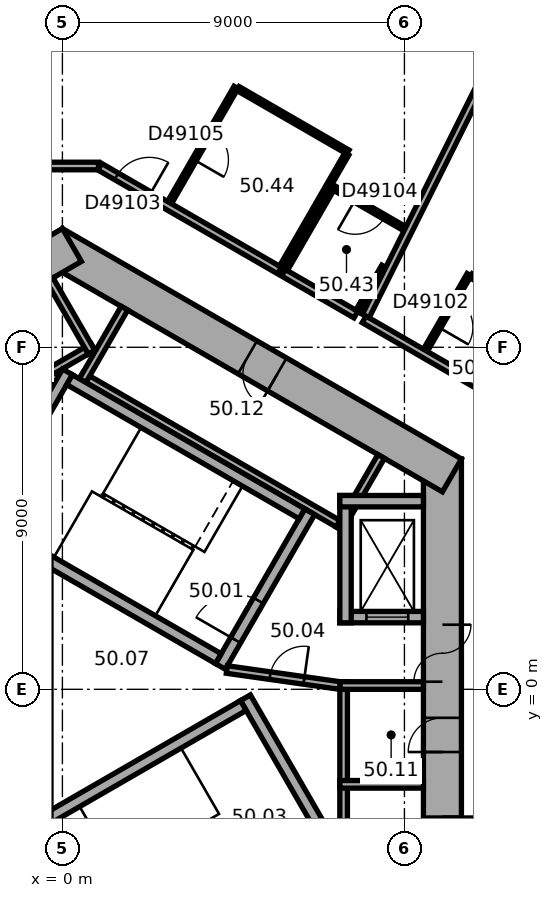
"""IFC4 building model, lengths in metres.
Left out: names, types, materials, properties, quantities, classifications, styles, units other than length and angle.
Written with IfcOpenShell. Run it as: python <this file> out.ifc"""

import sys

from ifc_helpers import new_model, si_unit, direction, frame, frame_2d, origin, place, context, subcontext, project, spatial, rectangle, extrude, element, fill, save


model = new_model("IFC4")
c1 = context("Model", 3, precision=1e-05, world=origin(), true_north=direction((0.0, 1.0)))
c2 = subcontext(c1, "Body", "Model", "MODEL_VIEW")
j1 = project(units=[si_unit("LENGTHUNIT", "METRE"), si_unit("PLANEANGLEUNIT", "RADIAN")], contexts=[c1])
p1 = place(None, origin())
s1 = spatial("IfcSite", under=j1, at=p1, CompositionType="ELEMENT")
p2 = place(p1, origin())
s2 = spatial("IfcBuilding", under=s1, at=p2, CompositionType="ELEMENT")
p3 = place(p2, frame((0.0, 0.0, 202.1)))
s3 = spatial("IfcBuildingStorey", under=s2, at=p3, CompositionType="ELEMENT", Elevation=202.1)
p4 = place(p3, frame((10.0, -6.062, 0.0), z_axis=(0.0, 0.0, 1.0), x_axis=(0.0, 1.0, 0.0)))
e1 = element("IfcWall", 1, at=p4, inside=s3, PredefinedType="SHEAR", context=c2, shape_type="SweptSolid", body=[
    extrude(rectangle(XDim=12.125, YDim=1.0, at=frame_2d((6.062, 0.0))), origin(), (0.0, 0.0, 1.0), 3.7),
])
p5 = place(p4, frame((6.262, 0.0, 0.0)))
e2 = element("IfcOpeningElement", 2, at=p5, cuts=e1, PredefinedType="OPENING", context=c2, shape_type="SweptSolid", body=[
    extrude(rectangle(XDim=1.5, YDim=2.1, at=frame_2d((0.75, 1.05))), frame((0.0, 0.51, 0.0), z_axis=(0.0, -1.0, 0.0), x_axis=(1.0, 0.0, 0.0)), (0.0, 0.0, 1.0), 1.02),
])
p6 = place(p4, frame((1.812, 0.0, 0.0)))
e3 = element("IfcOpeningElement", 3, at=p6, cuts=e1, PredefinedType="OPENING", context=c2, shape_type="SweptSolid", body=[
    extrude(rectangle(XDim=0.9, YDim=2.1, at=frame_2d((0.45, 1.05))), frame((0.0, 0.51, 0.0), z_axis=(0.0, -1.0, 0.0), x_axis=(1.0, 0.0, 0.0)), (0.0, 0.0, 1.0), 1.02),
])
p7 = place(p4, frame((4.412, 0.0, 0.0)))
e4 = element("IfcOpeningElement", 4, at=p7, cuts=e1, PredefinedType="OPENING", context=c2, shape_type="SweptSolid", body=[
    extrude(rectangle(XDim=0.9, YDim=2.1, at=frame_2d((0.45, 1.05))), frame((0.0, 0.51, 0.0), z_axis=(0.0, -1.0, 0.0), x_axis=(1.0, 0.0, 0.0)), (0.0, 0.0, 1.0), 1.02),
])
p8 = place(p3, frame((10.25, 5.629, 0.0), z_axis=(0.0, 0.0, 1.0), x_axis=(-0.866022616891, 0.50000482701, 0.0)))
e5 = element("IfcWall", 5, at=p8, inside=s3, PredefinedType="SHEAR", context=c2, shape_type="SweptSolid", body=[
    extrude(rectangle(XDim=12.125, YDim=1.0, at=frame_2d((6.062, 0.0))), origin(), (0.0, 0.0, 1.0), 3.7),
])
p9 = place(p8, frame((5.312, 0.0, 0.0)))
e6 = element("IfcOpeningElement", 6, at=p9, cuts=e5, PredefinedType="OPENING", context=c2, shape_type="SweptSolid", body=[
    extrude(rectangle(XDim=0.9, YDim=2.1, at=frame_2d((0.45, 1.05))), frame((0.0, 0.51, 0.0), z_axis=(0.0, -1.0, 0.0), x_axis=(1.0, 0.0, 0.0)), (0.0, 0.0, 1.0), 1.02),
])
p10 = place(p3, frame((0.25, 11.691, 0.0), z_axis=(0.0, 0.0, 1.0), x_axis=(-0.866022616891, -0.50000482701, 0.0)))
e7 = element("IfcWall", 7, at=p10, inside=s3, PredefinedType="SHEAR", context=c2, shape_type="SweptSolid", body=[
    extrude(rectangle(XDim=12.125, YDim=1.0, at=frame_2d((6.062, 0.0))), origin(), (0.0, 0.0, 1.0), 3.7),
])
p11 = place(p10, frame((6.262, 0.0, 0.0)))
e8 = element("IfcOpeningElement", 8, at=p11, cuts=e7, PredefinedType="OPENING", context=c2, shape_type="SweptSolid", body=[
    extrude(rectangle(XDim=1.5, YDim=2.1, at=frame_2d((0.75, 1.05))), frame((0.0, 0.51, 0.0), z_axis=(0.0, -1.0, 0.0), x_axis=(1.0, 0.0, 0.0)), (0.0, 0.0, 1.0), 1.02),
])
p12 = place(p10, frame((1.812, 0.0, 0.0)))
e9 = element("IfcOpeningElement", 9, at=p12, cuts=e7, PredefinedType="OPENING", context=c2, shape_type="SweptSolid", body=[
    extrude(rectangle(XDim=0.9, YDim=2.1, at=frame_2d((0.45, 1.05))), frame((0.0, 0.51, 0.0), z_axis=(0.0, -1.0, 0.0), x_axis=(1.0, 0.0, 0.0)), (0.0, 0.0, 1.0), 1.02),
])
p13 = place(p10, frame((4.412, 0.0, 0.0)))
e10 = element("IfcOpeningElement", 10, at=p13, cuts=e7, PredefinedType="OPENING", context=c2, shape_type="SweptSolid", body=[
    extrude(rectangle(XDim=0.9, YDim=2.1, at=frame_2d((0.45, 1.05))), frame((0.0, 0.51, 0.0), z_axis=(0.0, -1.0, 0.0), x_axis=(1.0, 0.0, 0.0)), (0.0, 0.0, 1.0), 1.02),
])
p14 = place(p3, frame((19.464, 14.599, 0.0), z_axis=(0.0, 0.0, 1.0), x_axis=(-0.894935755043, 0.446195018289, 0.0)))
e11 = element("IfcWall", 11, at=p14, inside=s3, PredefinedType="STANDARD", context=c2, shape_type="SweptSolid", body=[
    extrude(rectangle(XDim=20.044, YDim=0.2, at=frame_2d((10.022, 0.0))), origin(), (0.0, 0.0, 1.0), 3.7),
])
p15 = place(p14, frame((1.313, 0.0, 0.9)))
e12 = element("IfcOpeningElement", 12, at=p15, cuts=e11, PredefinedType="OPENING", context=c2, shape_type="SweptSolid", body=[
    extrude(rectangle(XDim=2.4, YDim=2.0, at=frame_2d((1.2, 1.0))), frame((0.0, 0.11, 0.0), z_axis=(0.0, -1.0, 0.0), x_axis=(1.0, 0.0, 0.0)), (0.0, 0.0, 1.0), 0.22),
])
p16 = place(p14, frame((5.067, 0.0, 0.9)))
e13 = element("IfcOpeningElement", 13, at=p16, cuts=e11, PredefinedType="OPENING", context=c2, shape_type="SweptSolid", body=[
    extrude(rectangle(XDim=2.4, YDim=2.0, at=frame_2d((1.2, 1.0))), frame((0.0, 0.11, 0.0), z_axis=(0.0, -1.0, 0.0), x_axis=(1.0, 0.0, 0.0)), (0.0, 0.0, 1.0), 0.22),
])
p17 = place(p14, frame((8.821, 0.0, 0.9)))
e14 = element("IfcOpeningElement", 14, at=p17, cuts=e11, PredefinedType="OPENING", context=c2, shape_type="SweptSolid", body=[
    extrude(rectangle(XDim=2.4, YDim=2.0, at=frame_2d((1.2, 1.0))), frame((0.0, 0.11, 0.0), z_axis=(0.0, -1.0, 0.0), x_axis=(1.0, 0.0, 0.0)), (0.0, 0.0, 1.0), 0.22),
])
p18 = place(p14, frame((12.575, 0.0, 0.9)))
e15 = element("IfcOpeningElement", 15, at=p18, cuts=e11, PredefinedType="OPENING", context=c2, shape_type="SweptSolid", body=[
    extrude(rectangle(XDim=2.4, YDim=2.0, at=frame_2d((1.2, 1.0))), frame((0.0, 0.11, 0.0), z_axis=(0.0, -1.0, 0.0), x_axis=(1.0, 0.0, 0.0)), (0.0, 0.0, 1.0), 0.22),
])
p19 = place(p14, frame((16.329, 0.0, 0.9)))
e16 = element("IfcOpeningElement", 16, at=p19, cuts=e11, PredefinedType="OPENING", context=c2, shape_type="SweptSolid", body=[
    extrude(rectangle(XDim=2.4, YDim=2.0, at=frame_2d((1.2, 1.0))), frame((0.0, 0.11, 0.0), z_axis=(0.0, -1.0, 0.0), x_axis=(1.0, 0.0, 0.0)), (0.0, 0.0, 1.0), 0.22),
])
p20 = place(p3, frame((7.4, -5.2, 0.0), z_axis=(0.0, 0.0, 1.0), x_axis=(0.0, 1.0, 0.0)))
e17 = element("IfcWall", 17, at=p20, inside=s3, PredefinedType="PARTITIONING", context=c2, shape_type="SweptSolid", body=[
    extrude(rectangle(XDim=5.4, YDim=0.2, at=frame_2d((2.7, 0.0))), origin(), (0.0, 0.0, 1.0), 3.35),
])
for number, where, z_axis, x_axis in (
    (18, (7.3, -2.5, 0.0), (0.0, 0.0, 1.0), (1.0, 0.0, 0.0)),
    (19, (7.3, 0.1, 0.0), (0.0, 0.0, 1.0), (1.0, 0.0, 0.0)),
):
    element("IfcWall", number, at=place(p3, frame(where, z_axis=z_axis, x_axis=x_axis)), inside=s3, PredefinedType="PARTITIONING", context=c2, shape_type="SweptSolid", body=[
        extrude(rectangle(XDim=2.2, YDim=0.2, at=frame_2d((1.1, 0.0))), origin(), (0.0, 0.0, 1.0), 3.35),
    ])
p21 = place(p3, frame((7.424, 4.259, 0.0), z_axis=(0.0, 0.0, 1.0), x_axis=(-0.866026010844, 0.49999894854, 0.0)))
e20 = element("IfcWall", 20, at=p21, inside=s3, PredefinedType="PARTITIONING", context=c2, shape_type="SweptSolid", body=[
    extrude(rectangle(XDim=8.0, YDim=0.2, at=frame_2d((4.0, 0.0))), origin(), (0.0, 0.0, 1.0), 3.35),
])
for number, where, z_axis, x_axis in (
    (21, (7.287, 4.222, 0.0), (0.0, 0.0, 1.0), (0.5, 0.866, 0.0)),
    (22, (0.532, 8.122, 0.0), (0.0, 0.0, 1.0), (0.5, 0.866, 0.0)),
):
    element("IfcWall", number, at=place(p3, frame(where, z_axis=z_axis, x_axis=x_axis)), inside=s3, PredefinedType="PARTITIONING", context=c2, shape_type="SweptSolid", body=[
        extrude(rectangle(XDim=2.2, YDim=0.2, at=frame_2d((1.1, 0.0))), origin(), (0.0, 0.0, 1.0), 3.35),
    ])
p22 = place(p3, frame((0.803, 9.009, 0.0), z_axis=(0.0, 0.0, 1.0), x_axis=(-0.866028230842, -0.499995103361, 0.0)))
e23 = element("IfcWall", 23, at=p22, inside=s3, PredefinedType="PARTITIONING", context=c2, shape_type="SweptSolid", body=[
    extrude(rectangle(XDim=5.4, YDim=0.2, at=frame_2d((2.7, 0.0))), origin(), (0.0, 0.0, 1.0), 3.35),
])
p23 = place(p3, frame((0.767, 8.872, 0.0), z_axis=(0.0, 0.0, 1.0), x_axis=(-0.499994660107, 0.866028486751, 0.0)))
e24 = element("IfcWall", 24, at=p23, inside=s3, PredefinedType="PARTITIONING", context=c2, shape_type="SweptSolid", body=[
    extrude(rectangle(XDim=2.2, YDim=0.2, at=frame_2d((1.1, 0.0))), origin(), (0.0, 0.0, 1.0), 3.35),
])
p24 = place(p3, frame((4.158, 0.602, 0.0), z_axis=(0.0, 0.0, 1.0), x_axis=(0.499977259774, 0.866038532462, 0.0)))
e25 = element("IfcWall", 25, at=p24, inside=s3, PredefinedType="SHEAR", context=c2, shape_type="SweptSolid", body=[
    extrude(rectangle(XDim=4.7, YDim=0.3, at=frame_2d((2.35, 0.0))), origin(), (0.0, 0.0, 1.0), 3.35),
])
p25 = place(p24, frame((0.8, 0.0, 0.0)))
e26 = element("IfcOpeningElement", 26, at=p25, cuts=e25, PredefinedType="OPENING", context=c2, shape_type="SweptSolid", body=[
    extrude(rectangle(XDim=1.2, YDim=2.1, at=frame_2d((0.6, 1.05))), frame((0.0, 0.16, 0.0), z_axis=(0.0, -1.0, 0.0), x_axis=(1.0, 0.0, 0.0)), (0.0, 0.0, 1.0), 0.32),
])
p26 = place(p3, frame((-2.216, 4.282, 0.0), z_axis=(0.0, 0.0, 1.0), x_axis=(0.499977259774, 0.866038532462, 0.0)))
e27 = element("IfcWall", 27, at=p26, inside=s3, PredefinedType="SHEAR", context=c2, shape_type="SweptSolid", body=[
    extrude(rectangle(XDim=4.7, YDim=0.3, at=frame_2d((2.35, 0.0))), origin(), (0.0, 0.0, 1.0), 3.35),
])
for number, where, z_axis, x_axis in (
    (28, (4.103, 0.807, 0.0), (0.0, 0.0, 1.0), (-0.866, 0.5, 0.0)),
    (29, (6.303, 4.617, 0.0), (0.0, 0.0, 1.0), (-0.866, 0.5, 0.0)),
):
    element("IfcWall", number, at=place(p3, frame(where, z_axis=z_axis, x_axis=x_axis)), inside=s3, PredefinedType="SHEAR", context=c2, shape_type="SweptSolid", body=[
        extrude(rectangle(XDim=7.06, YDim=0.3, at=frame_2d((3.53, 0.0))), origin(), (0.0, 0.0, 1.0), 3.35),
    ])
p27 = place(p3, frame((4.816, -0.222, 0.0), z_axis=(0.0, 0.0, 1.0), x_axis=(0.499977259774, -0.866038532462, 0.0)))
e30 = element("IfcWall", 30, at=p27, inside=s3, PredefinedType="SHEAR", context=c2, shape_type="SweptSolid", body=[
    extrude(rectangle(XDim=4.7, YDim=0.3, at=frame_2d((2.35, 0.0))), origin(), (0.0, 0.0, 1.0), 3.35),
])
p28 = place(p3, frame((-1.353, -3.957, 0.0), z_axis=(0.0, 0.0, 1.0), x_axis=(0.866027801685, 0.499995846692, 0.0)))
e31 = element("IfcWall", 31, at=p28, inside=s3, PredefinedType="SHEAR", context=c2, shape_type="SweptSolid", body=[
    extrude(rectangle(XDim=7.06, YDim=0.3, at=frame_2d((3.53, 0.0))), origin(), (0.0, 0.0, 1.0), 3.35),
])
p29 = place(p3, frame((7.3, 1.9, 0.0), z_axis=(0.0, 0.0, 1.0), x_axis=(1.0, 0.0, 0.0)))
e32 = element("IfcWall", 32, at=p29, inside=s3, PredefinedType="SHEAR", context=c2, shape_type="SweptSolid", body=[
    extrude(rectangle(XDim=2.2, YDim=0.3, at=frame_2d((1.1, 0.0))), origin(), (0.0, 0.0, 1.0), 3.35),
])
p30 = place(p29, frame((0.7, 0.0, 0.0)))
e33 = element("IfcOpeningElement", 33, at=p30, cuts=e32, PredefinedType="OPENING", context=c2, shape_type="SweptSolid", body=[
    extrude(rectangle(XDim=1.1, YDim=2.1, at=frame_2d((0.55, 1.05))), frame((0.0, 0.16, 0.0), z_axis=(0.0, -1.0, 0.0), x_axis=(1.0, 0.0, 0.0)), (0.0, 0.0, 1.0), 0.32),
])
p31 = place(p3, frame((7.45, 1.75, 0.0), z_axis=(0.0, 0.0, 1.0), x_axis=(0.0, 1.0, 0.0)))
e34 = element("IfcWall", 34, at=p31, inside=s3, PredefinedType="SHEAR", context=c2, shape_type="SweptSolid", body=[
    extrude(rectangle(XDim=3.35, YDim=0.3, at=frame_2d((1.675, 0.0))), origin(), (0.0, 0.0, 1.0), 3.35),
])
p32 = place(p3, frame((7.3, 4.95, 0.0), z_axis=(0.0, 0.0, 1.0), x_axis=(1.0, 0.0, 0.0)))
e35 = element("IfcWall", 35, at=p32, inside=s3, PredefinedType="SHEAR", context=c2, shape_type="SweptSolid", body=[
    extrude(rectangle(XDim=2.2, YDim=0.3, at=frame_2d((1.1, 0.0))), origin(), (0.0, 0.0, 1.0), 3.35),
])
p33 = place(p3, frame((4.327, 0.521, 0.0), z_axis=(0.0, 0.0, 1.0), x_axis=(0.990124376366, -0.14019172346, 0.0)))
e36 = element("IfcWall", 36, at=p33, inside=s3, PredefinedType="PARTITIONING", context=c2, shape_type="SweptSolid", body=[
    extrude(rectangle(XDim=3.002, YDim=0.2, at=frame_2d((1.501, 0.0))), origin(), (0.0, 0.0, 1.0), 3.35),
])
p34 = place(p33, frame((1.15, 0.0, 0.0)))
e37 = element("IfcOpeningElement", 37, at=p34, cuts=e36, PredefinedType="OPENING", context=c2, shape_type="SweptSolid", body=[
    extrude(rectangle(XDim=0.9, YDim=2.1, at=frame_2d((0.45, 1.05))), frame((0.0, 0.11, 0.0), z_axis=(0.0, -1.0, 0.0), x_axis=(1.0, 0.0, 0.0)), (0.0, 0.0, 1.0), 0.22),
])
p35 = place(p3, frame((0.95, 13.77, 0.0), z_axis=(0.0, 0.0, 1.0), x_axis=(-1.0, 0.0, 0.0)))
e38 = element("IfcWall", 38, at=p35, inside=s3, PredefinedType="PARTITIONING", context=c2, shape_type="SweptSolid", body=[
    extrude(rectangle(XDim=1.86, YDim=0.2, at=frame_2d((0.93, 0.0))), origin(), (0.0, 0.0, 1.0), 3.35),
])
p36 = place(p3, frame((2.819, 12.806, 0.0), z_axis=(0.0, 0.0, 1.0), x_axis=(0.500010275428, 0.866019471182, 0.0)))
e39 = element("IfcWall", 39, at=p36, inside=s3, PredefinedType="PARTITIONING", context=c2, shape_type="SweptSolid", body=[
    extrude(rectangle(XDim=3.5, YDim=0.12, at=frame_2d((1.75, 0.0))), origin(), (0.0, 0.0, 1.0), 3.35),
])
p37 = place(p36, frame((1.3, 0.0, 0.0)))
e40 = element("IfcOpeningElement", 40, at=p37, cuts=e39, PredefinedType="OPENING", context=c2, shape_type="SweptSolid", body=[
    extrude(rectangle(XDim=0.9, YDim=2.1, at=frame_2d((0.45, 1.05))), frame((0.0, 0.07, 0.0), z_axis=(0.0, -1.0, 0.0), x_axis=(1.0, 0.0, 0.0)), (0.0, 0.0, 1.0), 0.14),
])
p38 = place(p3, frame((4.621, 15.807, 0.0), z_axis=(0.0, 0.0, 1.0), x_axis=(0.866039519639, -0.499975549825, 0.0)))
e41 = element("IfcWall", 41, at=p38, inside=s3, PredefinedType="PARTITIONING", context=c2, shape_type="SweptSolid", body=[
    extrude(rectangle(XDim=3.34, YDim=0.12, at=frame_2d((1.67, 0.0))), origin(), (0.0, 0.0, 1.0), 3.35),
])
p39 = place(p3, frame((5.713, 11.02, 0.0), z_axis=(0.0, 0.0, 1.0), x_axis=(-0.866038905227, 0.499976614087, 0.0)))
e42 = element("IfcWall", 42, at=p39, inside=s3, PredefinedType="PARTITIONING", context=c2, shape_type="SweptSolid", body=[
    extrude(rectangle(XDim=5.46, YDim=0.2, at=frame_2d((2.73, 0.0))), origin(), (0.0, 0.0, 1.0), 3.35),
])
p40 = place(p39, frame((3.955, 0.0, 0.0)))
e43 = element("IfcOpeningElement", 43, at=p40, cuts=e42, PredefinedType="OPENING", context=c2, shape_type="SweptSolid", body=[
    extrude(rectangle(XDim=1.0, YDim=2.1, at=frame_2d((0.5, 1.05))), frame((0.0, 0.11, 0.0), z_axis=(0.0, -1.0, 0.0), x_axis=(1.0, 0.0, 0.0)), (0.0, 0.0, 1.0), 0.22),
])
p41 = place(p3, frame((5.867, 11.046, 0.0), z_axis=(0.0, 0.0, 1.0), x_axis=(0.500004234368, 0.866022959057, 0.0)))
e44 = element("IfcWall", 44, at=p41, inside=s3, PredefinedType="PARTITIONING", context=c2, shape_type="SweptSolid", body=[
    extrude(rectangle(XDim=2.5, YDim=0.12, at=frame_2d((1.25, 0.0))), origin(), (0.0, 0.0, 1.0), 3.35),
])
p42 = place(p3, frame((7.169, 13.181, 0.0), z_axis=(0.0, 0.0, 1.0), x_axis=(0.866048165231, -0.499960573946, 0.0)))
e45 = element("IfcWall", 45, at=p42, inside=s3, PredefinedType="PARTITIONING", context=c2, shape_type="SweptSolid", body=[
    extrude(rectangle(XDim=2.13, YDim=0.12, at=frame_2d((1.065, 0.0))), origin(), (0.0, 0.0, 1.0), 3.35),
])
p43 = place(p42, frame((0.615, 0.0, 0.0)))
e46 = element("IfcOpeningElement", 46, at=p43, cuts=e45, PredefinedType="OPENING", context=c2, shape_type="SweptSolid", body=[
    extrude(rectangle(XDim=0.9, YDim=2.1, at=frame_2d((0.45, 1.05))), frame((0.0, 0.07, 0.0), z_axis=(0.0, -1.0, 0.0), x_axis=(1.0, 0.0, 0.0)), (0.0, 0.0, 1.0), 0.14),
])
p44 = place(p3, frame((7.483, 14.085, 0.0), z_axis=(0.0, 0.0, 1.0), x_axis=(-0.499978425106, -0.866037859697, 0.0)))
e47 = element("IfcWall", 47, at=p44, inside=s3, PredefinedType="PARTITIONING", context=c2, shape_type="SweptSolid", body=[
    extrude(rectangle(XDim=3.44, YDim=0.12, at=frame_2d((1.72, 0.0))), origin(), (0.0, 0.0, 1.0), 3.35),
])
p45 = place(p3, frame((7.722, 9.86, 0.0), z_axis=(0.0, 0.0, 1.0), x_axis=(-0.86598042715, 0.500077893725, 0.0)))
e48 = element("IfcWall", 48, at=p45, inside=s3, PredefinedType="PARTITIONING", context=c2, shape_type="SweptSolid", body=[
    extrude(rectangle(XDim=2.2, YDim=0.2, at=frame_2d((1.1, 0.0))), origin(), (0.0, 0.0, 1.0), 3.35),
])
p46 = place(p3, frame((8.457, 11.132, 0.0), z_axis=(0.0, 0.0, 1.0), x_axis=(-0.500129009956, -0.865950907038, 0.0)))
e49 = element("IfcWall", 49, at=p46, inside=s3, PredefinedType="PARTITIONING", context=c2, shape_type="SweptSolid", body=[
    extrude(rectangle(XDim=1.369, YDim=0.12, at=frame_2d((0.685, 0.0))), origin(), (0.0, 0.0, 1.0), 3.35),
])
p47 = place(p3, frame((9.552, 8.919, 0.0), z_axis=(0.0, 0.0, 1.0), x_axis=(0.499952165731, 0.866053019151, 0.0)))
e50 = element("IfcWall", 50, at=p47, inside=s3, PredefinedType="PARTITIONING", context=c2, shape_type="SweptSolid", body=[
    extrude(rectangle(XDim=2.3, YDim=0.12, at=frame_2d((1.15, 0.0))), origin(), (0.0, 0.0, 1.0), 3.35),
])
p48 = place(p47, frame((0.7, 0.0, 0.0)))
e51 = element("IfcOpeningElement", 51, at=p48, cuts=e50, PredefinedType="OPENING", context=c2, shape_type="SweptSolid", body=[
    extrude(rectangle(XDim=0.9, YDim=2.1, at=frame_2d((0.45, 1.05))), frame((0.0, 0.07, 0.0), z_axis=(0.0, -1.0, 0.0), x_axis=(1.0, 0.0, 0.0)), (0.0, 0.0, 1.0), 0.14),
])
p49 = place(p3, frame((10.753, 10.881, 0.0), z_axis=(0.0, 0.0, 1.0), x_axis=(0.866043088465, -0.499969367985, 0.0)))
e52 = element("IfcWall", 52, at=p49, inside=s3, PredefinedType="PARTITIONING", context=c2, shape_type="SweptSolid", body=[
    extrude(rectangle(XDim=1.94, YDim=0.12, at=frame_2d((0.97, 0.0))), origin(), (0.0, 0.0, 1.0), 3.35),
])
p50 = place(p3, frame((11.233, 7.833, 0.0), z_axis=(0.0, 0.0, 1.0), x_axis=(-0.866002813504, 0.500039125473, 0.0)))
e53 = element("IfcWall", 53, at=p50, inside=s3, PredefinedType="PARTITIONING", context=c2, shape_type="SweptSolid", body=[
    extrude(rectangle(XDim=3.804, YDim=0.2, at=frame_2d((1.902, 0.0))), origin(), (0.0, 0.0, 1.0), 3.35),
])
p51 = place(p3, frame((11.73, 17.338, 0.0), z_axis=(0.0, 0.0, 1.0), x_axis=(-0.446189718314, -0.894938397473, 0.0)))
e54 = element("IfcWall", 54, at=p51, inside=s3, PredefinedType="PARTITIONING", context=c2, shape_type="SweptSolid", body=[
    extrude(rectangle(XDim=8.396, YDim=0.2, at=frame_2d((4.198, 0.0))), origin(), (0.0, 0.0, 1.0), 2.55),
])
p52 = place(p5, origin())
e55 = element("IfcDoor", 55, at=p52, inside=s3, OperationType="DOUBLE_DOOR_SINGLE_SWING", PredefinedType="DOOR", context=c2, shape_type="SweptSolid", body=[
    extrude(rectangle(XDim=1.5, YDim=2.1, at=frame_2d((0.75, 1.05))), frame((0.0, 0.025, 0.0), z_axis=(0.0, -1.0, 0.0), x_axis=(1.0, 0.0, 0.0)), (0.0, 0.0, 1.0), 0.05),
])
fill(e2, e55)
p53 = place(p25, origin())
e56 = element("IfcDoor", 56, at=p53, inside=s3, OperationType="SINGLE_SWING_RIGHT", PredefinedType="DOOR", context=c2, shape_type="SweptSolid", body=[
    extrude(rectangle(XDim=1.2, YDim=2.1, at=frame_2d((0.6, 1.05))), frame((0.0, 0.025, 0.0), z_axis=(0.0, -1.0, 0.0), x_axis=(1.0, 0.0, 0.0)), (0.0, 0.0, 1.0), 0.05),
])
fill(e26, e56)
p54 = place(p34, origin())
e57 = element("IfcDoor", 57, at=p54, inside=s3, OperationType="SINGLE_SWING_LEFT", PredefinedType="DOOR", context=c2, shape_type="SweptSolid", body=[
    extrude(rectangle(XDim=0.9, YDim=2.1, at=frame_2d((0.45, 1.05))), frame((0.0, 0.025, 0.0), z_axis=(0.0, -1.0, 0.0), x_axis=(1.0, 0.0, 0.0)), (0.0, 0.0, 1.0), 0.05),
])
fill(e37, e57)
p55 = place(p6, origin())
e58 = element("IfcDoor", 58, at=p55, inside=s3, OperationType="SINGLE_SWING_LEFT", PredefinedType="DOOR", context=c2, shape_type="SweptSolid", body=[
    extrude(rectangle(XDim=0.9, YDim=2.1, at=frame_2d((0.45, 1.05))), frame((0.0, 0.025, 0.0), z_axis=(0.0, -1.0, 0.0), x_axis=(1.0, 0.0, 0.0)), (0.0, 0.0, 1.0), 0.05),
])
fill(e3, e58)
p56 = place(p7, origin())
e59 = element("IfcDoor", 59, at=p56, inside=s3, OperationType="SINGLE_SWING_LEFT", PredefinedType="DOOR", context=c2, shape_type="SweptSolid", body=[
    extrude(rectangle(XDim=0.9, YDim=2.1, at=frame_2d((0.45, 1.05))), frame((0.0, 0.025, 0.0), z_axis=(0.0, -1.0, 0.0), x_axis=(1.0, 0.0, 0.0)), (0.0, 0.0, 1.0), 0.05),
])
fill(e4, e59)
p57 = place(p9, origin())
e60 = element("IfcDoor", 60, at=p57, inside=s3, OperationType="SINGLE_SWING_LEFT", PredefinedType="DOOR", context=c2, shape_type="SweptSolid", body=[
    extrude(rectangle(XDim=0.9, YDim=2.1, at=frame_2d((0.45, 1.05))), frame((0.0, 0.025, 0.0), z_axis=(0.0, -1.0, 0.0), x_axis=(1.0, 0.0, 0.0)), (0.0, 0.0, 1.0), 0.05),
])
fill(e6, e60)
p58 = place(p30, origin())
e61 = element("IfcDoor", 61, at=p58, inside=s3, OperationType="DOUBLE_DOOR_SLIDING", PredefinedType="DOOR", context=c2, shape_type="SweptSolid", body=[
    extrude(rectangle(XDim=1.1, YDim=2.1, at=frame_2d((0.55, 1.05))), frame((0.0, 0.025, 0.0), z_axis=(0.0, -1.0, 0.0), x_axis=(1.0, 0.0, 0.0)), (0.0, 0.0, 1.0), 0.05),
])
fill(e33, e61)
p59 = place(p48, origin())
e62 = element("IfcDoor", 62, at=p59, inside=s3, OperationType="SINGLE_SWING_LEFT", PredefinedType="DOOR", context=c2, shape_type="SweptSolid", body=[
    extrude(rectangle(XDim=0.9, YDim=2.1, at=frame_2d((0.45, 1.05))), frame((0.0, 0.025, 0.0), z_axis=(0.0, -1.0, 0.0), x_axis=(1.0, 0.0, 0.0)), (0.0, 0.0, 1.0), 0.05),
])
fill(e51, e62)
p60 = place(p40, origin())
e63 = element("IfcDoor", 63, at=p60, inside=s3, OperationType="SINGLE_SWING_LEFT", PredefinedType="DOOR", context=c2, shape_type="SweptSolid", body=[
    extrude(rectangle(XDim=1.0, YDim=2.1, at=frame_2d((0.5, 1.05))), frame((0.0, 0.025, 0.0), z_axis=(0.0, -1.0, 0.0), x_axis=(1.0, 0.0, 0.0)), (0.0, 0.0, 1.0), 0.05),
])
fill(e43, e63)
p61 = place(p43, origin())
e64 = element("IfcDoor", 64, at=p61, inside=s3, OperationType="SINGLE_SWING_LEFT", PredefinedType="DOOR", context=c2, shape_type="SweptSolid", body=[
    extrude(rectangle(XDim=0.9, YDim=2.1, at=frame_2d((0.45, 1.05))), frame((0.0, 0.025, 0.0), z_axis=(0.0, -1.0, 0.0), x_axis=(1.0, 0.0, 0.0)), (0.0, 0.0, 1.0), 0.05),
])
fill(e46, e64)
p62 = place(p37, origin())
e65 = element("IfcDoor", 65, at=p62, inside=s3, OperationType="SINGLE_SWING_LEFT", PredefinedType="DOOR", context=c2, shape_type="SweptSolid", body=[
    extrude(rectangle(XDim=0.9, YDim=2.1, at=frame_2d((0.45, 1.05))), frame((0.0, 0.025, 0.0), z_axis=(0.0, -1.0, 0.0), x_axis=(1.0, 0.0, 0.0)), (0.0, 0.0, 1.0), 0.05),
])
fill(e40, e65)
save(model, sys.argv[1])
